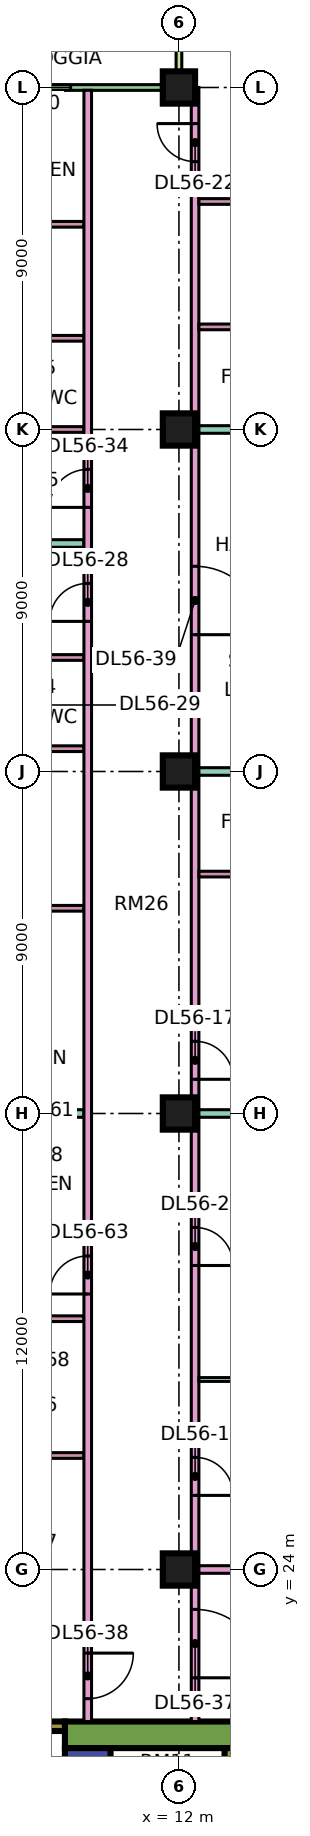
"""IFC4 building model, lengths in metres.
Left out: names, types, materials, properties, quantities, classifications, styles, units other than length and angle.
Written with IfcOpenShell. Run it as: python <this file> out.ifc"""

import sys

from ifc_helpers import new_model, si_unit, direction, frame, frame_2d, origin, origin_2d, place, context, subcontext, project, spatial, rectangle, extrude, element, fill, save


model = new_model("IFC4")
c1 = context("Model", 3, precision=1e-05, world=origin(), true_north=direction((0.0, 1.0)))
c2 = subcontext(c1, "Body", "Model", "MODEL_VIEW")
j1 = project(units=[si_unit("LENGTHUNIT", "METRE"), si_unit("PLANEANGLEUNIT", "RADIAN")], contexts=[c1])
p1 = place(None, origin())
s1 = spatial("IfcSite", under=j1, at=p1, CompositionType="ELEMENT")
p2 = place(p1, origin())
s2 = spatial("IfcBuilding", under=s1, at=p2, CompositionType="ELEMENT")
p3 = place(p2, frame((0.0, 0.0, 237.9)))
s3 = spatial("IfcBuildingStorey", under=s2, at=p3, CompositionType="ELEMENT", Elevation=237.9)
for number, where, z_axis, x_axis in (
    (1, (12.0, 24.0, 0.0), (0.0, 0.0, 1.0), (1.0, 0.0, 0.0)),
    (2, (12.0, 36.0, 0.0), (0.0, 0.0, 1.0), (1.0, 0.0, 0.0)),
    (3, (12.0, 45.0, 0.0), (0.0, 0.0, 1.0), (1.0, 0.0, 0.0)),
    (4, (12.0, 54.0, 0.0), (0.0, 0.0, 1.0), (1.0, 0.0, 0.0)),
    (5, (12.0, 63.0, 0.0), (0.0, 0.0, 1.0), (1.0, 0.0, 0.0)),
):
    element("IfcColumn", number, at=place(p3, frame(where, z_axis=z_axis, x_axis=x_axis)), inside=s3, PredefinedType="COLUMN", context=c2, shape_type="SweptSolid", body=[
        extrude(rectangle(XDim=0.85, YDim=0.85, at=origin_2d()), origin(), (0.0, 0.0, 1.0), 3.75),
    ])
p4 = place(p3, frame((9.0, 19.65, 0.0), z_axis=(0.0, 0.0, 1.0), x_axis=(1.0, 0.0, 0.0)))
e6 = element("IfcWall", 6, at=p4, inside=s3, PredefinedType="SHEAR", context=c2, shape_type="SweptSolid", body=[
    extrude(rectangle(XDim=25.0, YDim=0.7, at=frame_2d((12.5, 0.0))), origin(), (0.0, 0.0, 1.0), 3.75),
])
p5 = place(p4, frame((19.1, 0.0, 0.0)))
e7 = element("IfcOpeningElement", 7, at=p5, cuts=e6, PredefinedType="OPENING", context=c2, shape_type="SweptSolid", body=[
    extrude(rectangle(XDim=1.8, YDim=2.4, at=frame_2d((0.9, 1.2))), frame((0.0, 0.36, 0.0), z_axis=(0.0, -1.0, 0.0), x_axis=(1.0, 0.0, 0.0)), (0.0, 0.0, 1.0), 0.72),
])
p6 = place(p3, frame((9.6, 7.7, 0.0), z_axis=(0.0, 0.0, 1.0), x_axis=(0.0, 1.0, 0.0)))
e8 = element("IfcWall", 8, at=p6, inside=s3, PredefinedType="SHEAR", context=c2, shape_type="SweptSolid", body=[
    extrude(rectangle(XDim=11.6, YDim=1.2, at=frame_2d((5.8, 0.0))), origin(), (0.0, 0.0, 1.0), 3.75),
])
p7 = place(p6, frame((4.175, 0.0, 0.0)))
e9 = element("IfcOpeningElement", 9, at=p7, cuts=e8, PredefinedType="OPENING", context=c2, shape_type="SweptSolid", body=[
    extrude(rectangle(XDim=1.1, YDim=2.2, at=frame_2d((0.55, 1.1))), frame((0.0, 0.61, 0.0), z_axis=(0.0, -1.0, 0.0), x_axis=(1.0, 0.0, 0.0)), (0.0, 0.0, 1.0), 1.22),
])
p8 = place(p6, frame((6.675, 0.0, 0.0)))
e10 = element("IfcOpeningElement", 10, at=p8, cuts=e8, PredefinedType="OPENING", context=c2, shape_type="SweptSolid", body=[
    extrude(rectangle(XDim=1.1, YDim=2.2, at=frame_2d((0.55, 1.1))), frame((0.0, 0.61, 0.0), z_axis=(0.0, -1.0, 0.0), x_axis=(1.0, 0.0, 0.0)), (0.0, 0.0, 1.0), 1.22),
])
p9 = place(p6, frame((9.55, 0.0, 0.0)))
e11 = element("IfcOpeningElement", 11, at=p9, cuts=e8, PredefinedType="OPENING", context=c2, shape_type="SweptSolid", body=[
    extrude(rectangle(XDim=1.1, YDim=2.2, at=frame_2d((0.55, 1.1))), frame((0.0, 0.61, 0.0), z_axis=(0.0, -1.0, 0.0), x_axis=(1.0, 0.0, 0.0)), (0.0, 0.0, 1.0), 1.22),
])
p10 = place(p6, frame((1.85, 0.0, 0.0)))
e12 = element("IfcOpeningElement", 12, at=p10, cuts=e8, PredefinedType="OPENING", context=c2, shape_type="SweptSolid", body=[
    extrude(rectangle(XDim=0.9, YDim=2.1, at=frame_2d((0.45, 1.05))), frame((0.0, 0.61, 0.0), z_axis=(0.0, -1.0, 0.0), x_axis=(1.0, 0.0, 0.0)), (0.0, 0.0, 1.0), 1.22),
])
p11 = place(p3, frame((13.325, 7.7, 0.0), z_axis=(0.0, 0.0, 1.0), x_axis=(0.0, 1.0, 0.0)))
e13 = element("IfcWall", 13, at=p11, inside=s3, PredefinedType="SHEAR", context=c2, shape_type="SweptSolid", body=[
    extrude(rectangle(XDim=11.6, YDim=0.25, at=frame_2d((5.8, 0.0))), origin(), (0.0, 0.0, 1.0), 3.75),
])
p12 = place(p3, frame((2.1, 19.875, 0.0), z_axis=(0.0, 0.0, 1.0), x_axis=(1.0, 0.0, 0.0)))
e14 = element("IfcWall", 14, at=p12, inside=s3, PredefinedType="SHEAR", context=c2, shape_type="SweptSolid", body=[
    extrude(rectangle(XDim=6.9, YDim=0.25, at=frame_2d((3.45, 0.0))), origin(), (0.0, 0.0, 1.0), 3.75),
])
p13 = place(p12, frame((1.175, 0.0, 0.0)))
e15 = element("IfcOpeningElement", 15, at=p13, cuts=e14, PredefinedType="OPENING", context=c2, shape_type="SweptSolid", body=[
    extrude(rectangle(XDim=1.1, YDim=2.2, at=frame_2d((0.55, 1.1))), frame((0.0, 0.135, 0.0), z_axis=(0.0, -1.0, 0.0), x_axis=(1.0, 0.0, 0.0)), (0.0, 0.0, 1.0), 0.27),
])
p14 = place(p12, frame((4.6, 0.0, 0.0)))
e16 = element("IfcOpeningElement", 16, at=p14, cuts=e14, PredefinedType="OPENING", context=c2, shape_type="SweptSolid", body=[
    extrude(rectangle(XDim=1.2, YDim=2.2, at=frame_2d((0.6, 1.1))), frame((0.0, 0.135, 0.0), z_axis=(0.0, -1.0, 0.0), x_axis=(1.0, 0.0, 0.0)), (0.0, 0.0, 1.0), 0.27),
])
p15 = place(p3, frame((11.925, 63.0, 0.0), z_axis=(0.0, 0.0, 1.0), x_axis=(-1.0, 0.0, 0.0)))
e17 = element("IfcWall", 17, at=p15, inside=s3, PredefinedType="SOLIDWALL", context=c2, shape_type="SweptSolid", body=[
    extrude(rectangle(XDim=10.35, YDim=0.15, at=frame_2d((5.175, 0.0))), origin(), (0.0, 0.0, 1.0), 3.35),
])
p16 = place(p15, frame((2.775, 0.0, 0.45)))
e18 = element("IfcOpeningElement", 18, at=p16, cuts=e17, PredefinedType="OPENING", context=c2, shape_type="SweptSolid", body=[
    extrude(rectangle(XDim=2.4, YDim=2.4, at=frame_2d((1.2, 1.2))), frame((0.0, 0.085, 0.0), z_axis=(0.0, -1.0, 0.0), x_axis=(1.0, 0.0, 0.0)), (0.0, 0.0, 1.0), 0.17),
])
p17 = place(p15, frame((7.087, 0.0, 0.0)))
e19 = element("IfcOpeningElement", 19, at=p17, cuts=e17, PredefinedType="OPENING", context=c2, shape_type="SweptSolid", body=[
    extrude(rectangle(XDim=1.8, YDim=2.4, at=frame_2d((0.9, 1.2))), frame((0.0, 0.085, 0.0), z_axis=(0.0, -1.0, 0.0), x_axis=(1.0, 0.0, 0.0)), (0.0, 0.0, 1.0), 0.17),
])
p18 = place(p3, frame((12.0, 64.5, 0.0), z_axis=(0.0, 0.0, 1.0), x_axis=(0.0, -1.0, 0.0)))
e20 = element("IfcWall", 20, at=p18, inside=s3, PredefinedType="SOLIDWALL", context=c2, shape_type="SweptSolid", body=[
    extrude(rectangle(XDim=1.5, YDim=0.15, at=frame_2d((0.75, 0.0))), origin(), (0.0, 0.0, 1.0), 3.35),
])
p19 = place(p3, frame((-1.35, 22.4, 0.0), z_axis=(0.0, 0.0, 1.0), x_axis=(1.0, 0.0, 0.0)))
e21 = element("IfcWall", 21, at=p19, inside=s3, PredefinedType="PARTITIONING", context=c2, shape_type="SweptSolid", body=[
    extrude(rectangle(XDim=10.85, YDim=0.2, at=frame_2d((5.425, 0.0))), origin(), (0.0, 0.0, 1.0), 3.35),
])
p20 = place(p3, frame((0.074, 51.0, 0.0), z_axis=(0.0, 0.0, 1.0), x_axis=(1.0, 0.0, 0.0)))
e22 = element("IfcWall", 22, at=p20, inside=s3, PredefinedType="PARTITIONING", context=c2, shape_type="SweptSolid", body=[
    extrude(rectangle(XDim=9.426, YDim=0.2, at=frame_2d((4.713, 0.0))), origin(), (0.0, 0.0, 1.0), 3.35),
])
for number, where, z_axis, x_axis in (
    (23, (6.375, 41.4, 0.0), (0.0, 0.0, 1.0), (1.0, 0.0, 0.0)),
    (24, (6.375, 45.6, 0.0), (0.0, 0.0, 1.0), (1.0, 0.0, 0.0)),
    (25, (6.375, 48.0, 0.0), (0.0, 0.0, 1.0), (1.0, 0.0, 0.0)),
    (26, (6.375, 54.0, 0.0), (0.0, 0.0, 1.0), (1.0, 0.0, 0.0)),
    (27, (6.375, 56.4, 0.0), (0.0, 0.0, 1.0), (1.0, 0.0, 0.0)),
    (28, (6.375, 59.4, 0.0), (0.0, 0.0, 1.0), (1.0, 0.0, 0.0)),
):
    element("IfcWall", number, at=place(p3, frame(where, z_axis=z_axis, x_axis=x_axis)), inside=s3, PredefinedType="PARTITIONING", context=c2, shape_type="SweptSolid", body=[
        extrude(rectangle(XDim=3.125, YDim=0.15, at=frame_2d((1.562, 0.0))), origin(), (0.0, 0.0, 1.0), 3.35),
    ])
p21 = place(p3, frame((6.55, 36.0, 0.0), z_axis=(0.0, 0.0, 1.0), x_axis=(1.0, 0.0, 0.0)))
e29 = element("IfcWall", 29, at=p21, inside=s3, PredefinedType="PARTITIONING", context=c2, shape_type="SweptSolid", body=[
    extrude(rectangle(XDim=2.95, YDim=0.2, at=frame_2d((1.475, 0.0))), origin(), (0.0, 0.0, 1.0), 3.35),
])
p22 = place(p3, frame((6.65, 33.0, 0.0), z_axis=(0.0, 0.0, 1.0), x_axis=(1.0, 0.0, 0.0)))
e30 = element("IfcWall", 30, at=p22, inside=s3, PredefinedType="PARTITIONING", context=c2, shape_type="SweptSolid", body=[
    extrude(rectangle(XDim=2.85, YDim=0.1, at=frame_2d((1.425, 0.0))), origin(), (0.0, 0.0, 1.0), 3.35),
])
p23 = place(p3, frame((6.675, 27.0, 0.0), z_axis=(0.0, 0.0, 1.0), x_axis=(1.0, 0.0, 0.0)))
e31 = element("IfcWall", 31, at=p23, inside=s3, PredefinedType="PARTITIONING", context=c2, shape_type="SweptSolid", body=[
    extrude(rectangle(XDim=2.825, YDim=0.15, at=frame_2d((1.413, 0.0))), origin(), (0.0, 0.0, 1.0), 3.35),
])
p24 = place(p3, frame((6.675, 30.6, 0.0), z_axis=(0.0, 0.0, 1.0), x_axis=(1.0, 0.0, 0.0)))
e32 = element("IfcWall", 32, at=p24, inside=s3, PredefinedType="PARTITIONING", context=c2, shape_type="SweptSolid", body=[
    extrude(rectangle(XDim=2.825, YDim=0.15, at=frame_2d((1.413, 0.0))), origin(), (0.0, 0.0, 1.0), 3.35),
])
p25 = place(p24, frame((0.975, 0.0, 0.0)))
e33 = element("IfcOpeningElement", 33, at=p25, cuts=e32, PredefinedType="OPENING", context=c2, shape_type="SweptSolid", body=[
    extrude(rectangle(XDim=0.8, YDim=2.1, at=frame_2d((0.4, 1.05))), frame((0.0, 0.085, 0.0), z_axis=(0.0, -1.0, 0.0), x_axis=(1.0, 0.0, 0.0)), (0.0, 0.0, 1.0), 0.17),
])
p26 = place(p3, frame((9.6, 20.0, 0.0), z_axis=(0.0, 0.0, 1.0), x_axis=(0.0, 1.0, 0.0)))
e34 = element("IfcWall", 34, at=p26, inside=s3, PredefinedType="PARTITIONING", context=c2, shape_type="SweptSolid", body=[
    extrude(rectangle(XDim=42.926, YDim=0.2, at=frame_2d((21.463, 0.0))), origin(), (0.0, 0.0, 1.0), 3.35),
])
p27 = place(p26, frame((28.95, 0.0, 0.0)))
e35 = element("IfcOpeningElement", 35, at=p27, cuts=e34, PredefinedType="OPENING", context=c2, shape_type="SweptSolid", body=[
    extrude(rectangle(XDim=1.0, YDim=2.1, at=frame_2d((0.5, 1.05))), frame((0.0, 0.11, 0.0), z_axis=(0.0, -1.0, 0.0), x_axis=(1.0, 0.0, 0.0)), (0.0, 0.0, 1.0), 0.22),
])
p28 = place(p26, frame((31.95, 0.0, 0.0)))
e36 = element("IfcOpeningElement", 36, at=p28, cuts=e34, PredefinedType="OPENING", context=c2, shape_type="SweptSolid", body=[
    extrude(rectangle(XDim=1.0, YDim=2.1, at=frame_2d((0.5, 1.05))), frame((0.0, 0.11, 0.0), z_axis=(0.0, -1.0, 0.0), x_axis=(1.0, 0.0, 0.0)), (0.0, 0.0, 1.0), 0.22),
])
p29 = place(p26, frame((0.6, 0.0, 0.0)))
e37 = element("IfcOpeningElement", 37, at=p29, cuts=e34, PredefinedType="OPENING", context=c2, shape_type="SweptSolid", body=[
    extrude(rectangle(XDim=1.2, YDim=2.1, at=frame_2d((0.6, 1.05))), frame((0.0, 0.11, 0.0), z_axis=(0.0, -1.0, 0.0), x_axis=(1.0, 0.0, 0.0)), (0.0, 0.0, 1.0), 0.22),
])
p30 = place(p26, frame((11.25, 0.0, 0.0)))
e38 = element("IfcOpeningElement", 38, at=p30, cuts=e34, PredefinedType="OPENING", context=c2, shape_type="SweptSolid", body=[
    extrude(rectangle(XDim=1.0, YDim=2.1, at=frame_2d((0.5, 1.05))), frame((0.0, 0.11, 0.0), z_axis=(0.0, -1.0, 0.0), x_axis=(1.0, 0.0, 0.0)), (0.0, 0.0, 1.0), 0.22),
])
p31 = place(p3, frame((12.425, 20.0, 0.0), z_axis=(0.0, 0.0, 1.0), x_axis=(0.0, 1.0, 0.0)))
e39 = element("IfcWall", 39, at=p31, inside=s3, PredefinedType="PARTITIONING", context=c2, shape_type="SweptSolid", body=[
    extrude(rectangle(XDim=43.0, YDim=0.2, at=frame_2d((21.5, 0.0))), origin(), (0.0, 0.0, 1.0), 3.35),
])
p32 = place(p31, frame((5.95, 0.0, 0.0)))
e40 = element("IfcOpeningElement", 40, at=p32, cuts=e39, PredefinedType="OPENING", context=c2, shape_type="SweptSolid", body=[
    extrude(rectangle(XDim=1.0, YDim=2.1, at=frame_2d((0.5, 1.05))), frame((0.0, 0.11, 0.0), z_axis=(0.0, -1.0, 0.0), x_axis=(1.0, 0.0, 0.0)), (0.0, 0.0, 1.0), 0.22),
])
p33 = place(p31, frame((12.0, 0.0, 0.0)))
e41 = element("IfcOpeningElement", 41, at=p33, cuts=e39, PredefinedType="OPENING", context=c2, shape_type="SweptSolid", body=[
    extrude(rectangle(XDim=1.0, YDim=2.1, at=frame_2d((0.5, 1.05))), frame((0.0, 0.11, 0.0), z_axis=(0.0, -1.0, 0.0), x_axis=(1.0, 0.0, 0.0)), (0.0, 0.0, 1.0), 0.22),
])
p34 = place(p31, frame((16.9, 0.0, 0.0)))
e42 = element("IfcOpeningElement", 42, at=p34, cuts=e39, PredefinedType="OPENING", context=c2, shape_type="SweptSolid", body=[
    extrude(rectangle(XDim=1.0, YDim=2.1, at=frame_2d((0.5, 1.05))), frame((0.0, 0.11, 0.0), z_axis=(0.0, -1.0, 0.0), x_axis=(1.0, 0.0, 0.0)), (0.0, 0.0, 1.0), 0.22),
])
p35 = place(p31, frame((41.05, 0.0, 0.0)))
e43 = element("IfcOpeningElement", 43, at=p35, cuts=e39, PredefinedType="OPENING", context=c2, shape_type="SweptSolid", body=[
    extrude(rectangle(XDim=1.0, YDim=2.1, at=frame_2d((0.5, 1.05))), frame((0.0, 0.11, 0.0), z_axis=(0.0, -1.0, 0.0), x_axis=(1.0, 0.0, 0.0)), (0.0, 0.0, 1.0), 0.22),
])
p36 = place(p31, frame((1.15, 0.0, 0.0)))
e44 = element("IfcOpeningElement", 44, at=p36, cuts=e39, PredefinedType="OPENING", context=c2, shape_type="SweptSolid", body=[
    extrude(rectangle(XDim=1.8, YDim=2.1, at=frame_2d((0.9, 1.05))), frame((0.0, 0.11, 0.0), z_axis=(0.0, -1.0, 0.0), x_axis=(1.0, 0.0, 0.0)), (0.0, 0.0, 1.0), 0.22),
])
p37 = place(p31, frame((28.6, 0.0, 0.0)))
e45 = element("IfcOpeningElement", 45, at=p37, cuts=e39, PredefinedType="OPENING", context=c2, shape_type="SweptSolid", body=[
    extrude(rectangle(XDim=1.8, YDim=2.1, at=frame_2d((0.9, 1.05))), frame((0.0, 0.11, 0.0), z_axis=(0.0, -1.0, 0.0), x_axis=(1.0, 0.0, 0.0)), (0.0, 0.0, 1.0), 0.22),
])
p38 = place(p3, frame((12.525, 24.0, 0.0), z_axis=(0.0, 0.0, 1.0), x_axis=(1.0, 0.0, 0.0)))
e46 = element("IfcWall", 46, at=p38, inside=s3, PredefinedType="PARTITIONING", context=c2, shape_type="SweptSolid", body=[
    extrude(rectangle(XDim=8.975, YDim=0.2, at=frame_2d((4.488, 0.0))), origin(), (0.0, 0.0, 1.0), 3.35),
])
p39 = place(p3, frame((12.525, 29.0, 0.0), z_axis=(0.0, 0.0, 1.0), x_axis=(1.0, 0.0, 0.0)))
e47 = element("IfcWall", 47, at=p39, inside=s3, PredefinedType="PARTITIONING", context=c2, shape_type="SweptSolid", body=[
    extrude(rectangle(XDim=8.975, YDim=0.1, at=frame_2d((4.488, 0.0))), origin(), (0.0, 0.0, 1.0), 3.35),
])
p40 = place(p3, frame((12.525, 36.0, 0.0), z_axis=(0.0, 0.0, 1.0), x_axis=(1.0, 0.0, 0.0)))
e48 = element("IfcWall", 48, at=p40, inside=s3, PredefinedType="PARTITIONING", context=c2, shape_type="SweptSolid", body=[
    extrude(rectangle(XDim=11.475, YDim=0.2, at=frame_2d((5.738, 0.0))), origin(), (0.0, 0.0, 1.0), 3.35),
])
for number, where, z_axis, x_axis in (
    (49, (12.525, 38.7, 0.0), (0.0, 0.0, 1.0), (1.0, 0.0, 0.0)),
    (50, (12.525, 42.3, 0.0), (0.0, 0.0, 1.0), (1.0, 0.0, 0.0)),
):
    element("IfcWall", number, at=place(p3, frame(where, z_axis=z_axis, x_axis=x_axis)), inside=s3, PredefinedType="PARTITIONING", context=c2, shape_type="SweptSolid", body=[
        extrude(rectangle(XDim=5.225, YDim=0.15, at=frame_2d((2.613, 0.0))), origin(), (0.0, 0.0, 1.0), 3.35),
    ])
p41 = place(p3, frame((12.525, 45.0, 0.0), z_axis=(0.0, 0.0, 1.0), x_axis=(1.0, 0.0, 0.0)))
e51 = element("IfcWall", 51, at=p41, inside=s3, PredefinedType="PARTITIONING", context=c2, shape_type="SweptSolid", body=[
    extrude(rectangle(XDim=11.475, YDim=0.2, at=frame_2d((5.738, 0.0))), origin(), (0.0, 0.0, 1.0), 3.35),
])
p42 = place(p3, frame((12.525, 54.0, 0.0), z_axis=(0.0, 0.0, 1.0), x_axis=(1.0, 0.0, 0.0)))
e52 = element("IfcWall", 52, at=p42, inside=s3, PredefinedType="PARTITIONING", context=c2, shape_type="SweptSolid", body=[
    extrude(rectangle(XDim=11.401, YDim=0.2, at=frame_2d((5.701, 0.0))), origin(), (0.0, 0.0, 1.0), 3.35),
])
for number, where, z_axis, x_axis in (
    (53, (12.525, 56.7, 0.0), (0.0, 0.0, 1.0), (1.0, 0.0, 0.0)),
    (54, (12.525, 60.0, 0.0), (0.0, 0.0, 1.0), (1.0, 0.0, 0.0)),
):
    element("IfcWall", number, at=place(p3, frame(where, z_axis=z_axis, x_axis=x_axis)), inside=s3, PredefinedType="PARTITIONING", context=c2, shape_type="SweptSolid", body=[
        extrude(rectangle(XDim=5.225, YDim=0.15, at=frame_2d((2.613, 0.0))), origin(), (0.0, 0.0, 1.0), 3.35),
    ])
p43 = place(p16, origin())
e55 = element("IfcWindow", 55, at=p43, inside=s3, PartitioningType="SINGLE_PANEL", PredefinedType="WINDOW", context=c2, shape_type="SweptSolid", body=[
    extrude(rectangle(XDim=2.4, YDim=2.4, at=frame_2d((1.2, 1.2))), frame((0.0, 0.03, 0.0), z_axis=(0.0, -1.0, 0.0), x_axis=(1.0, 0.0, 0.0)), (0.0, 0.0, 1.0), 0.06),
])
fill(e18, e55)
p44 = place(p32, frame((1.0, 0.0, 0.0), z_axis=(0.0, 0.0, 1.0), x_axis=(-1.0, 0.0, 0.0)))
e56 = element("IfcDoor", 56, at=p44, inside=s3, OperationType="SINGLE_SWING_LEFT", PredefinedType="DOOR", context=c2, shape_type="SweptSolid", body=[
    extrude(rectangle(XDim=1.0, YDim=2.1, at=frame_2d((0.5, 1.05))), frame((0.0, 0.025, 0.0), z_axis=(0.0, -1.0, 0.0), x_axis=(1.0, 0.0, 0.0)), (0.0, 0.0, 1.0), 0.05),
])
fill(e40, e56)
p45 = place(p33, frame((1.0, 0.0, 0.0), z_axis=(0.0, 0.0, 1.0), x_axis=(-1.0, 0.0, 0.0)))
e57 = element("IfcDoor", 57, at=p45, inside=s3, OperationType="SINGLE_SWING_LEFT", PredefinedType="DOOR", context=c2, shape_type="SweptSolid", body=[
    extrude(rectangle(XDim=1.0, YDim=2.1, at=frame_2d((0.5, 1.05))), frame((0.0, 0.025, 0.0), z_axis=(0.0, -1.0, 0.0), x_axis=(1.0, 0.0, 0.0)), (0.0, 0.0, 1.0), 0.05),
])
fill(e41, e57)
p46 = place(p34, frame((1.0, 0.0, 0.0), z_axis=(0.0, 0.0, 1.0), x_axis=(-1.0, 0.0, 0.0)))
e58 = element("IfcDoor", 58, at=p46, inside=s3, OperationType="SINGLE_SWING_LEFT", PredefinedType="DOOR", context=c2, shape_type="SweptSolid", body=[
    extrude(rectangle(XDim=1.0, YDim=2.1, at=frame_2d((0.5, 1.05))), frame((0.0, 0.025, 0.0), z_axis=(0.0, -1.0, 0.0), x_axis=(1.0, 0.0, 0.0)), (0.0, 0.0, 1.0), 0.05),
])
fill(e42, e58)
p47 = place(p35, frame((1.0, 0.0, 0.0), z_axis=(0.0, 0.0, 1.0), x_axis=(-1.0, 0.0, 0.0)))
e59 = element("IfcDoor", 59, at=p47, inside=s3, OperationType="SINGLE_SWING_RIGHT", PredefinedType="DOOR", context=c2, shape_type="SweptSolid", body=[
    extrude(rectangle(XDim=1.0, YDim=2.1, at=frame_2d((0.5, 1.05))), frame((0.0, 0.025, 0.0), z_axis=(0.0, -1.0, 0.0), x_axis=(1.0, 0.0, 0.0)), (0.0, 0.0, 1.0), 0.05),
])
fill(e43, e59)
p48 = place(p27, origin())
e60 = element("IfcDoor", 60, at=p48, inside=s3, OperationType="SINGLE_SWING_LEFT", PredefinedType="DOOR", context=c2, shape_type="SweptSolid", body=[
    extrude(rectangle(XDim=1.0, YDim=2.1, at=frame_2d((0.5, 1.05))), frame((0.0, 0.025, 0.0), z_axis=(0.0, -1.0, 0.0), x_axis=(1.0, 0.0, 0.0)), (0.0, 0.0, 1.0), 0.05),
])
fill(e35, e60)
p49 = place(p28, origin())
e61 = element("IfcDoor", 61, at=p49, inside=s3, OperationType="SINGLE_SWING_LEFT", PredefinedType="DOOR", context=c2, shape_type="SweptSolid", body=[
    extrude(rectangle(XDim=1.0, YDim=2.1, at=frame_2d((0.5, 1.05))), frame((0.0, 0.025, 0.0), z_axis=(0.0, -1.0, 0.0), x_axis=(1.0, 0.0, 0.0)), (0.0, 0.0, 1.0), 0.05),
])
fill(e36, e61)
p50 = place(p36, frame((1.8, 0.0, 0.0), z_axis=(0.0, 0.0, 1.0), x_axis=(-1.0, 0.0, 0.0)))
e62 = element("IfcDoor", 62, at=p50, inside=s3, OperationType="DOUBLE_DOOR_SINGLE_SWING", PredefinedType="DOOR", context=c2, shape_type="SweptSolid", body=[
    extrude(rectangle(XDim=1.8, YDim=2.1, at=frame_2d((0.9, 1.05))), frame((0.0, 0.025, 0.0), z_axis=(0.0, -1.0, 0.0), x_axis=(1.0, 0.0, 0.0)), (0.0, 0.0, 1.0), 0.05),
])
fill(e44, e62)
p51 = place(p29, origin())
e63 = element("IfcDoor", 63, at=p51, inside=s3, OperationType="SINGLE_SWING_RIGHT", PredefinedType="DOOR", context=c2, shape_type="SweptSolid", body=[
    extrude(rectangle(XDim=1.2, YDim=2.1, at=frame_2d((0.6, 1.05))), frame((0.0, 0.025, 0.0), z_axis=(0.0, -1.0, 0.0), x_axis=(1.0, 0.0, 0.0)), (0.0, 0.0, 1.0), 0.05),
])
fill(e37, e63)
p52 = place(p37, frame((1.8, 0.0, 0.0), z_axis=(0.0, 0.0, 1.0), x_axis=(-1.0, 0.0, 0.0)))
e64 = element("IfcDoor", 64, at=p52, inside=s3, OperationType="DOUBLE_DOOR_SINGLE_SWING", PredefinedType="DOOR", context=c2, shape_type="SweptSolid", body=[
    extrude(rectangle(XDim=1.8, YDim=2.1, at=frame_2d((0.9, 1.05))), frame((0.0, 0.025, 0.0), z_axis=(0.0, -1.0, 0.0), x_axis=(1.0, 0.0, 0.0)), (0.0, 0.0, 1.0), 0.05),
])
fill(e45, e64)
p53 = place(p30, origin())
e65 = element("IfcDoor", 65, at=p53, inside=s3, OperationType="SINGLE_SWING_LEFT", PredefinedType="DOOR", context=c2, shape_type="SweptSolid", body=[
    extrude(rectangle(XDim=1.0, YDim=2.1, at=frame_2d((0.5, 1.05))), frame((0.0, 0.025, 0.0), z_axis=(0.0, -1.0, 0.0), x_axis=(1.0, 0.0, 0.0)), (0.0, 0.0, 1.0), 0.05),
])
fill(e38, e65)
save(model, sys.argv[1])
